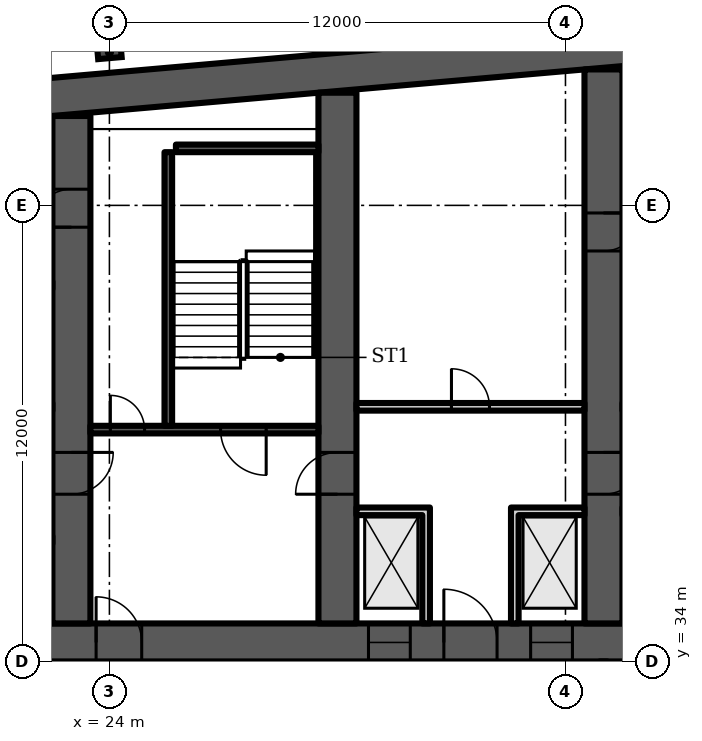
"""IFC4 building model, lengths in metres.
Left out: names, types, materials, properties, quantities, classifications, styles, units other than length and angle.
Written with IfcOpenShell. Run it as: python <this file> out.ifc"""

import sys

from ifc_helpers import new_model, si_unit, direction, frame, frame_2d, origin, origin_2d, place, context, subcontext, project, spatial, polyline, rectangle, i_section, outline, extrude, element, fill, save


model = new_model("IFC4")
c1 = context("Model", 3, precision=1e-05, world=origin(), true_north=direction((0.0, 1.0)))
c2 = subcontext(c1, "Body", "Model", "MODEL_VIEW")
j1 = project(units=[si_unit("LENGTHUNIT", "METRE"), si_unit("PLANEANGLEUNIT", "RADIAN")], contexts=[c1])
p1 = place(None, origin())
s1 = spatial("IfcSite", under=j1, at=p1, CompositionType="ELEMENT")
p2 = place(p1, origin())
s2 = spatial("IfcBuilding", under=s1, at=p2, CompositionType="ELEMENT")
p3 = place(p2, frame((0.0, 0.0, 121.9)))
s3 = spatial("IfcBuildingStorey", under=s2, at=p3, CompositionType="ELEMENT", Elevation=121.9)
p4 = place(p3, origin())
e1 = element("IfcWall", 1, at=p4, inside=s3, PredefinedType="SHEAR", context=c2, shape_type="SweptSolid", body=[
    extrude(outline(polyline([(16.0, 47.784), (40.5, 49.927), (65.0, 47.784), (65.0, 48.787), (40.5, 50.931), (16.0, 48.787), (16.0, 47.784)])), origin(), (0.0, 0.0, 1.0), 3.6),
])
p5 = place(p3, frame((16.0, 34.5, 0.0), z_axis=(0.0, 0.0, 1.0), x_axis=(1.0, 0.0, 0.0)))
e2 = element("IfcWall", 2, at=p5, inside=s3, PredefinedType="SHEAR", context=c2, shape_type="SweptSolid", body=[
    extrude(rectangle(XDim=49.0, YDim=1.0, at=frame_2d((24.5, 0.0))), origin(), (0.0, 0.0, 1.0), 3.6),
])
p6 = place(p5, frame((1.2, 0.0, 0.0)))
e3 = element("IfcOpeningElement", 3, at=p6, cuts=e2, PredefinedType="OPENING", context=c2, shape_type="SweptSolid", body=[
    extrude(rectangle(XDim=1.1, YDim=2.1, at=frame_2d((0.55, 1.05))), frame((0.0, 0.51, 0.0), z_axis=(0.0, -1.0, 0.0), x_axis=(1.0, 0.0, 0.0)), (0.0, 0.0, 1.0), 1.02),
])
p7 = place(p5, frame((5.083, 0.0, 0.0)))
e4 = element("IfcOpeningElement", 4, at=p7, cuts=e2, PredefinedType="OPENING", context=c2, shape_type="SweptSolid", body=[
    extrude(rectangle(XDim=1.1, YDim=2.1, at=frame_2d((0.55, 1.05))), frame((0.0, 0.51, 0.0), z_axis=(0.0, -1.0, 0.0), x_axis=(1.0, 0.0, 0.0)), (0.0, 0.0, 1.0), 1.02),
])
p8 = place(p5, frame((2.933, 0.0, 0.0)))
e5 = element("IfcOpeningElement", 5, at=p8, cuts=e2, PredefinedType="OPENING", context=c2, shape_type="SweptSolid", body=[
    extrude(rectangle(XDim=1.4, YDim=2.1, at=frame_2d((0.7, 1.05))), frame((0.0, 0.51, 0.0), z_axis=(0.0, -1.0, 0.0), x_axis=(1.0, 0.0, 0.0)), (0.0, 0.0, 1.0), 1.02),
])
p9 = place(p5, frame((7.65, 0.0, 0.0)))
e6 = element("IfcOpeningElement", 6, at=p9, cuts=e2, PredefinedType="OPENING", context=c2, shape_type="SweptSolid", body=[
    extrude(rectangle(XDim=1.2, YDim=2.1, at=frame_2d((0.6, 1.05))), frame((0.0, 0.51, 0.0), z_axis=(0.0, -1.0, 0.0), x_axis=(1.0, 0.0, 0.0)), (0.0, 0.0, 1.0), 1.02),
])
p10 = place(p5, frame((14.817, 0.0, 0.0)))
e7 = element("IfcOpeningElement", 7, at=p10, cuts=e2, PredefinedType="OPENING", context=c2, shape_type="SweptSolid", body=[
    extrude(rectangle(XDim=1.1, YDim=2.1, at=frame_2d((0.55, 1.05))), frame((0.0, 0.51, 0.0), z_axis=(0.0, -1.0, 0.0), x_axis=(1.0, 0.0, 0.0)), (0.0, 0.0, 1.0), 1.02),
])
p11 = place(p5, frame((19.083, 0.0, 0.0)))
e8 = element("IfcOpeningElement", 8, at=p11, cuts=e2, PredefinedType="OPENING", context=c2, shape_type="SweptSolid", body=[
    extrude(rectangle(XDim=1.1, YDim=2.1, at=frame_2d((0.55, 1.05))), frame((0.0, 0.51, 0.0), z_axis=(0.0, -1.0, 0.0), x_axis=(1.0, 0.0, 0.0)), (0.0, 0.0, 1.0), 1.02),
])
p12 = place(p5, frame((16.8, 0.0, 0.0)))
e9 = element("IfcOpeningElement", 9, at=p12, cuts=e2, PredefinedType="OPENING", context=c2, shape_type="SweptSolid", body=[
    extrude(rectangle(XDim=1.4, YDim=2.1, at=frame_2d((0.7, 1.05))), frame((0.0, 0.51, 0.0), z_axis=(0.0, -1.0, 0.0), x_axis=(1.0, 0.0, 0.0)), (0.0, 0.0, 1.0), 1.02),
])
p13 = place(p5, frame((21.817, 0.0, 0.0)))
e10 = element("IfcOpeningElement", 10, at=p13, cuts=e2, PredefinedType="OPENING", context=c2, shape_type="SweptSolid", body=[
    extrude(rectangle(XDim=1.1, YDim=2.1, at=frame_2d((0.55, 1.05))), frame((0.0, 0.51, 0.0), z_axis=(0.0, -1.0, 0.0), x_axis=(1.0, 0.0, 0.0)), (0.0, 0.0, 1.0), 1.02),
])
p14 = place(p5, frame((26.083, 0.0, 0.0)))
e11 = element("IfcOpeningElement", 11, at=p14, cuts=e2, PredefinedType="OPENING", context=c2, shape_type="SweptSolid", body=[
    extrude(rectangle(XDim=1.1, YDim=2.1, at=frame_2d((0.55, 1.05))), frame((0.0, 0.51, 0.0), z_axis=(0.0, -1.0, 0.0), x_axis=(1.0, 0.0, 0.0)), (0.0, 0.0, 1.0), 1.02),
])
p15 = place(p5, frame((33.15, 0.0, 0.0)))
e12 = element("IfcOpeningElement", 12, at=p15, cuts=e2, PredefinedType="OPENING", context=c2, shape_type="SweptSolid", body=[
    extrude(rectangle(XDim=1.2, YDim=2.1, at=frame_2d((0.6, 1.05))), frame((0.0, 0.51, 0.0), z_axis=(0.0, -1.0, 0.0), x_axis=(1.0, 0.0, 0.0)), (0.0, 0.0, 1.0), 1.02),
])
p16 = place(p5, frame((37.8, 0.0, 0.0)))
e13 = element("IfcOpeningElement", 13, at=p16, cuts=e2, PredefinedType="OPENING", context=c2, shape_type="SweptSolid", body=[
    extrude(rectangle(XDim=1.4, YDim=2.1, at=frame_2d((0.7, 1.05))), frame((0.0, 0.51, 0.0), z_axis=(0.0, -1.0, 0.0), x_axis=(1.0, 0.0, 0.0)), (0.0, 0.0, 1.0), 1.02),
])
p17 = place(p5, frame((42.817, 0.0, 0.0)))
e14 = element("IfcOpeningElement", 14, at=p17, cuts=e2, PredefinedType="OPENING", context=c2, shape_type="SweptSolid", body=[
    extrude(rectangle(XDim=1.1, YDim=2.1, at=frame_2d((0.55, 1.05))), frame((0.0, 0.51, 0.0), z_axis=(0.0, -1.0, 0.0), x_axis=(1.0, 0.0, 0.0)), (0.0, 0.0, 1.0), 1.02),
])
p18 = place(p5, frame((46.7, 0.0, 0.0)))
e15 = element("IfcOpeningElement", 15, at=p18, cuts=e2, PredefinedType="OPENING", context=c2, shape_type="SweptSolid", body=[
    extrude(rectangle(XDim=1.1, YDim=2.1, at=frame_2d((0.55, 1.05))), frame((0.0, 0.51, 0.0), z_axis=(0.0, -1.0, 0.0), x_axis=(1.0, 0.0, 0.0)), (0.0, 0.0, 1.0), 1.02),
])
p19 = place(p5, frame((44.667, 0.0, 0.0)))
e16 = element("IfcOpeningElement", 16, at=p19, cuts=e2, PredefinedType="OPENING", context=c2, shape_type="SweptSolid", body=[
    extrude(rectangle(XDim=1.4, YDim=2.1, at=frame_2d((0.7, 1.05))), frame((0.0, 0.51, 0.0), z_axis=(0.0, -1.0, 0.0), x_axis=(1.0, 0.0, 0.0)), (0.0, 0.0, 1.0), 1.02),
])
p20 = place(p3, frame((23.0, 35.0, 0.0), z_axis=(0.0, 0.0, 1.0), x_axis=(0.0, 1.0, 0.0)))
e17 = element("IfcWall", 17, at=p20, inside=s3, PredefinedType="SHEAR", context=c2, shape_type="SweptSolid", body=[
    extrude(rectangle(XDim=13.352, YDim=1.0, at=frame_2d((6.676, 0.0))), origin(), (0.0, 0.0, 1.0), 3.6),
])
p21 = place(p20, frame((10.426, 0.0, 0.0)))
e18 = element("IfcOpeningElement", 18, at=p21, cuts=e17, PredefinedType="OPENING", context=c2, shape_type="SweptSolid", body=[
    extrude(rectangle(XDim=1.0, YDim=2.1, at=frame_2d((0.5, 1.05))), frame((0.0, 0.51, 0.0), z_axis=(0.0, -1.0, 0.0), x_axis=(1.0, 0.0, 0.0)), (0.0, 0.0, 1.0), 1.02),
])
p22 = place(p20, frame((3.4, 0.0, 0.0)))
e19 = element("IfcOpeningElement", 19, at=p22, cuts=e17, PredefinedType="OPENING", context=c2, shape_type="SweptSolid", body=[
    extrude(rectangle(XDim=1.1, YDim=2.1, at=frame_2d((0.55, 1.05))), frame((0.0, 0.51, 0.0), z_axis=(0.0, -1.0, 0.0), x_axis=(1.0, 0.0, 0.0)), (0.0, 0.0, 1.0), 1.02),
])
p23 = place(p3, frame((30.0, 35.0, 0.0), z_axis=(0.0, 0.0, 1.0), x_axis=(0.0, 1.0, 0.0)))
e20 = element("IfcWall", 20, at=p23, inside=s3, PredefinedType="SHEAR", context=c2, shape_type="SweptSolid", body=[
    extrude(rectangle(XDim=13.965, YDim=1.0, at=frame_2d((6.982, 0.0))), origin(), (0.0, 0.0, 1.0), 3.6),
])
p24 = place(p23, frame((3.4, 0.0, 0.0)))
e21 = element("IfcOpeningElement", 21, at=p24, cuts=e20, PredefinedType="OPENING", context=c2, shape_type="SweptSolid", body=[
    extrude(rectangle(XDim=1.1, YDim=2.1, at=frame_2d((0.55, 1.05))), frame((0.0, 0.51, 0.0), z_axis=(0.0, -1.0, 0.0), x_axis=(1.0, 0.0, 0.0)), (0.0, 0.0, 1.0), 1.02),
])
p25 = place(p3, frame((37.0, 35.0, 0.0), z_axis=(0.0, 0.0, 1.0), x_axis=(0.0, 1.0, 0.0)))
e22 = element("IfcWall", 22, at=p25, inside=s3, PredefinedType="SHEAR", context=c2, shape_type="SweptSolid", body=[
    extrude(rectangle(XDim=14.577, YDim=1.0, at=frame_2d((7.289, 0.0))), origin(), (0.0, 0.0, 1.0), 3.6),
])
p26 = place(p25, frame((3.4, 0.0, 0.0)))
e23 = element("IfcOpeningElement", 23, at=p26, cuts=e22, PredefinedType="OPENING", context=c2, shape_type="SweptSolid", body=[
    extrude(rectangle(XDim=1.1, YDim=2.1, at=frame_2d((0.55, 1.05))), frame((0.0, 0.51, 0.0), z_axis=(0.0, -1.0, 0.0), x_axis=(1.0, 0.0, 0.0)), (0.0, 0.0, 1.0), 1.02),
])
p27 = place(p25, frame((9.8, 0.0, 0.0)))
e24 = element("IfcOpeningElement", 24, at=p27, cuts=e22, PredefinedType="OPENING", context=c2, shape_type="SweptSolid", body=[
    extrude(rectangle(XDim=1.0, YDim=2.1, at=frame_2d((0.5, 1.05))), frame((0.0, 0.51, 0.0), z_axis=(0.0, -1.0, 0.0), x_axis=(1.0, 0.0, 0.0)), (0.0, 0.0, 1.0), 1.02),
])
p28 = place(p3, frame((24.0, 50.027, 0.0), z_axis=(0.0, 0.0, 1.0), x_axis=(-0.087156, 0.996198, 0.0)))
e25 = element("IfcColumn", 25, at=p28, inside=s3, PredefinedType="COLUMN", context=c2, shape_type="SweptSolid", body=[
    extrude(i_section(OverallWidth=0.305, OverallDepth=0.62, WebThickness=0.021, FlangeThickness=0.04, FilletRadius=0.027, at=origin_2d()), origin(), (0.0, 0.0, 1.0), 3.6),
])
p29 = place(p3, frame((23.5, 40.1, 0.0), z_axis=(0.0, 0.0, 1.0), x_axis=(1.0, 0.0, 0.0)))
e26 = element("IfcWall", 26, at=p29, inside=s3, PredefinedType="SHEAR", context=c2, shape_type="SweptSolid", body=[
    extrude(rectangle(XDim=6.0, YDim=0.2, at=frame_2d((3.0, 0.0))), origin(), (0.0, 0.0, 1.0), 3.2),
])
p30 = place(p29, frame((3.425, 0.0, 0.0)))
e27 = element("IfcOpeningElement", 27, at=p30, cuts=e26, PredefinedType="OPENING", context=c2, shape_type="SweptSolid", body=[
    extrude(rectangle(XDim=1.2, YDim=2.1, at=frame_2d((0.6, 1.05))), frame((0.0, 0.11, 0.0), z_axis=(0.0, -1.0, 0.0), x_axis=(1.0, 0.0, 0.0)), (0.0, 0.0, 1.0), 0.22),
])
p31 = place(p29, frame((0.525, 0.0, 0.0)))
e28 = element("IfcOpeningElement", 28, at=p31, cuts=e26, PredefinedType="OPENING", context=c2, shape_type="SweptSolid", body=[
    extrude(rectangle(XDim=0.9, YDim=2.1, at=frame_2d((0.45, 1.05))), frame((0.0, 0.11, 0.0), z_axis=(0.0, -1.0, 0.0), x_axis=(1.0, 0.0, 0.0)), (0.0, 0.0, 1.0), 0.22),
])
p32 = place(p3, frame((25.55, 40.2, 0.0), z_axis=(0.0, 0.0, 1.0), x_axis=(0.0, 1.0, 0.0)))
e29 = element("IfcWall", 29, at=p32, inside=s3, PredefinedType="SHEAR", context=c2, shape_type="SweptSolid", body=[
    extrude(rectangle(XDim=7.2, YDim=0.2, at=frame_2d((3.6, 0.0))), origin(), (0.0, 0.0, 1.0), 3.2),
])
p33 = place(p3, frame((25.75, 47.5, 0.0), z_axis=(0.0, 0.0, 1.0), x_axis=(1.0, 0.0, 0.0)))
e30 = element("IfcWall", 30, at=p33, inside=s3, PredefinedType="SHEAR", context=c2, shape_type="SweptSolid", body=[
    extrude(rectangle(XDim=3.75, YDim=0.2, at=frame_2d((1.875, 0.0))), origin(), (0.0, 0.0, 1.0), 3.2),
])
p34 = place(p3, frame((30.5, 40.7, 0.0), z_axis=(0.0, 0.0, 1.0), x_axis=(1.0, 0.0, 0.0)))
e31 = element("IfcWall", 31, at=p34, inside=s3, PredefinedType="PARTITIONING", context=c2, shape_type="SweptSolid", body=[
    extrude(rectangle(XDim=6.0, YDim=0.2, at=frame_2d((3.0, 0.0))), origin(), (0.0, 0.0, 1.0), 3.2),
])
p35 = place(p34, frame((2.5, 0.0, 0.0)))
e32 = element("IfcOpeningElement", 32, at=p35, cuts=e31, PredefinedType="OPENING", context=c2, shape_type="SweptSolid", body=[
    extrude(rectangle(XDim=1.0, YDim=2.1, at=frame_2d((0.5, 1.05))), frame((0.0, 0.11, 0.0), z_axis=(0.0, -1.0, 0.0), x_axis=(1.0, 0.0, 0.0)), (0.0, 0.0, 1.0), 0.22),
])
p36 = place(p3, origin())
e33 = element("IfcWall", 33, at=p36, inside=s3, PredefinedType="PARTITIONING", context=c2, shape_type="SweptSolid", body=[
    extrude(outline(polyline([(32.233, 37.85), (30.5, 37.85), (30.5, 38.05), (32.233, 38.05), (32.433, 38.05), (32.433, 35.0), (32.233, 35.0), (32.233, 37.85)])), origin(), (0.0, 0.0, 1.0), 3.2),
])
p37 = place(p3, origin())
e34 = element("IfcWall", 34, at=p37, inside=s3, PredefinedType="PARTITIONING", context=c2, shape_type="SweptSolid", body=[
    extrude(outline(polyline([(34.567, 38.05), (34.767, 38.05), (36.5, 38.05), (36.5, 37.85), (34.767, 37.85), (34.767, 35.0), (34.567, 35.0), (34.567, 38.05)])), origin(), (0.0, 0.0, 1.0), 3.2),
])
p38 = place(p21, origin())
e35 = element("IfcDoor", 35, at=p38, inside=s3, OperationType="SINGLE_SWING_LEFT", PredefinedType="DOOR", context=c2, shape_type="SweptSolid", body=[
    extrude(rectangle(XDim=1.0, YDim=2.1, at=frame_2d((0.5, 1.05))), frame((0.0, 0.5, 0.0), z_axis=(0.0, -1.0, 0.0), x_axis=(1.0, 0.0, 0.0)), (0.0, 0.0, 1.0), 1.0),
])
fill(e18, e35)
p39 = place(p30, origin())
e36 = element("IfcDoor", 36, at=p39, inside=s3, OperationType="SINGLE_SWING_RIGHT", PredefinedType="DOOR", context=c2, shape_type="SweptSolid", body=[
    extrude(rectangle(XDim=1.2, YDim=2.1, at=frame_2d((0.6, 1.05))), frame((0.0, 0.025, 0.0), z_axis=(0.0, -1.0, 0.0), x_axis=(1.0, 0.0, 0.0)), (0.0, 0.0, 1.0), 0.05),
])
fill(e27, e36)
p40 = place(p31, origin())
e37 = element("IfcDoor", 37, at=p40, inside=s3, OperationType="SINGLE_SWING_LEFT", PredefinedType="DOOR", context=c2, shape_type="SweptSolid", body=[
    extrude(rectangle(XDim=0.9, YDim=2.1, at=frame_2d((0.45, 1.05))), frame((0.0, 0.025, 0.0), z_axis=(0.0, -1.0, 0.0), x_axis=(1.0, 0.0, 0.0)), (0.0, 0.0, 1.0), 0.05),
])
fill(e28, e37)
p41 = place(p9, origin())
e38 = element("IfcDoor", 38, at=p41, inside=s3, OperationType="SINGLE_SWING_LEFT", PredefinedType="DOOR", context=c2, shape_type="SweptSolid", body=[
    extrude(rectangle(XDim=1.2, YDim=2.1, at=frame_2d((0.6, 1.05))), frame((0.0, 0.025, 0.0), z_axis=(0.0, -1.0, 0.0), x_axis=(1.0, 0.0, 0.0)), (0.0, 0.0, 1.0), 0.05),
])
fill(e6, e38)
p42 = place(p10, origin())
e39 = element("IfcDoor", 39, at=p42, inside=s3, OperationType="DOUBLE_DOOR_SLIDING", PredefinedType="DOOR", context=c2, shape_type="SweptSolid", body=[
    extrude(rectangle(XDim=1.1, YDim=2.1, at=frame_2d((0.55, 1.05))), frame((0.0, 0.025, 0.0), z_axis=(0.0, -1.0, 0.0), x_axis=(1.0, 0.0, 0.0)), (0.0, 0.0, 1.0), 0.05),
])
fill(e7, e39)
p43 = place(p11, origin())
e40 = element("IfcDoor", 40, at=p43, inside=s3, OperationType="DOUBLE_DOOR_SLIDING", PredefinedType="DOOR", context=c2, shape_type="SweptSolid", body=[
    extrude(rectangle(XDim=1.1, YDim=2.1, at=frame_2d((0.55, 1.05))), frame((0.0, 0.025, 0.0), z_axis=(0.0, -1.0, 0.0), x_axis=(1.0, 0.0, 0.0)), (0.0, 0.0, 1.0), 0.05),
])
fill(e8, e40)
p44 = place(p12, origin())
e41 = element("IfcDoor", 41, at=p44, inside=s3, OperationType="DOUBLE_DOOR_SINGLE_SWING", PredefinedType="DOOR", context=c2, shape_type="SweptSolid", body=[
    extrude(rectangle(XDim=1.4, YDim=2.1, at=frame_2d((0.7, 1.05))), frame((0.0, 0.025, 0.0), z_axis=(0.0, -1.0, 0.0), x_axis=(1.0, 0.0, 0.0)), (0.0, 0.0, 1.0), 0.05),
])
fill(e9, e41)
p45 = place(p35, origin())
e42 = element("IfcDoor", 42, at=p45, inside=s3, OperationType="SINGLE_SWING_LEFT", PredefinedType="DOOR", context=c2, shape_type="SweptSolid", body=[
    extrude(rectangle(XDim=1.0, YDim=2.1, at=frame_2d((0.5, 1.05))), frame((0.0, 0.025, 0.0), z_axis=(0.0, -1.0, 0.0), x_axis=(1.0, 0.0, 0.0)), (0.0, 0.0, 1.0), 0.05),
])
fill(e32, e42)
p46 = place(p22, origin())
e43 = element("IfcDoor", 43, at=p46, inside=s3, OperationType="SINGLE_SWING_RIGHT", PredefinedType="DOOR", context=c2, shape_type="SweptSolid", body=[
    extrude(rectangle(XDim=1.1, YDim=2.1, at=frame_2d((0.55, 1.05))), frame((0.0, 0.025, 0.0), z_axis=(0.0, -1.0, 0.0), x_axis=(1.0, 0.0, 0.0)), (0.0, 0.0, 1.0), 0.05),
])
fill(e19, e43)
p47 = place(p24, origin())
e44 = element("IfcDoor", 44, at=p47, inside=s3, OperationType="SINGLE_SWING_LEFT", PredefinedType="DOOR", context=c2, shape_type="SweptSolid", body=[
    extrude(rectangle(XDim=1.1, YDim=2.1, at=frame_2d((0.55, 1.05))), frame((0.0, 0.025, 0.0), z_axis=(0.0, -1.0, 0.0), x_axis=(1.0, 0.0, 0.0)), (0.0, 0.0, 1.0), 0.05),
])
fill(e21, e44)
p48 = place(p26, origin())
e45 = element("IfcDoor", 45, at=p48, inside=s3, OperationType="SINGLE_SWING_RIGHT", PredefinedType="DOOR", context=c2, shape_type="SweptSolid", body=[
    extrude(rectangle(XDim=1.1, YDim=2.1, at=frame_2d((0.55, 1.05))), frame((0.0, 0.025, 0.0), z_axis=(0.0, -1.0, 0.0), x_axis=(1.0, 0.0, 0.0)), (0.0, 0.0, 1.0), 0.05),
])
fill(e23, e45)
p49 = place(p27, origin())
e46 = element("IfcDoor", 46, at=p49, inside=s3, OperationType="SINGLE_SWING_RIGHT", PredefinedType="DOOR", context=c2, shape_type="SweptSolid", body=[
    extrude(rectangle(XDim=1.0, YDim=2.1, at=frame_2d((0.5, 1.05))), frame((0.0, 0.5, 0.0), z_axis=(0.0, -1.0, 0.0), x_axis=(1.0, 0.0, 0.0)), (0.0, 0.0, 1.0), 1.0),
])
fill(e24, e46)
save(model, sys.argv[1])
